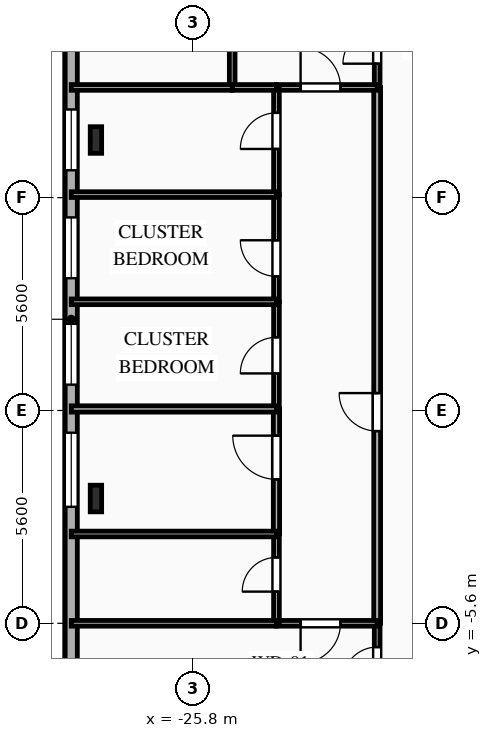
"""IFC4 building model, lengths in metres.
Left out: names, types, materials, properties, quantities, classifications, styles, units other than length and angle.
Written with IfcOpenShell. Run it as: python <this file> out.ifc"""

import sys

from ifc_helpers import new_model, si_unit, direction, frame, frame_2d, origin, origin_2d, place, context, subcontext, project, spatial, rectangle, i_section, extrude, element, fill, save


model = new_model("IFC4")
c1 = context("Model", 3, precision=1e-05, world=origin(), true_north=direction((0.0, 1.0)))
c2 = subcontext(c1, "Body", "Model", "MODEL_VIEW")
j1 = project(units=[si_unit("LENGTHUNIT", "METRE"), si_unit("PLANEANGLEUNIT", "RADIAN")], contexts=[c1])
p1 = place(None, origin())
s1 = spatial("IfcSite", under=j1, at=p1, CompositionType="ELEMENT")
p2 = place(p1, origin())
s2 = spatial("IfcBuilding", under=s1, at=p2, CompositionType="ELEMENT")
p3 = place(p2, frame((0.0, 0.0, 141.05)))
s3 = spatial("IfcBuildingStorey", under=s2, at=p3, CompositionType="ELEMENT", Elevation=141.05)
for number, where, z_axis, x_axis in (
    (1, (-28.35, 7.117, 0.0), (0.0, 0.0, 1.0), (1.0, 0.0, 0.0)),
    (2, (-28.35, -2.317, 0.0), (0.0, 0.0, 1.0), (1.0, 0.0, 0.0)),
):
    element("IfcColumn", number, at=place(p3, frame(where, z_axis=z_axis, x_axis=x_axis)), inside=s3, PredefinedType="COLUMN", context=c2, shape_type="SweptSolid", body=[
        extrude(i_section(OverallWidth=0.3, OverallDepth=0.7, WebThickness=0.017, FlangeThickness=0.032, FilletRadius=0.027, at=origin_2d()), origin(), (0.0, 0.0, 1.0), 3.35),
    ])
p4 = place(p3, frame((-29.0, -12.4, 0.0), z_axis=(0.0, 0.0, 1.0), x_axis=(0.0, 1.0, 0.0)))
e3 = element("IfcWall", 3, at=p4, inside=s3, PredefinedType="SOLIDWALL", context=c2, shape_type="SweptSolid", body=[
    extrude(rectangle(XDim=29.6, YDim=0.32, at=frame_2d((14.8, 0.0))), origin(), (0.0, 0.0, 1.0), 3.04),
])
p5 = place(p4, frame((2.855, 0.0, 0.85)))
e4 = element("IfcOpeningElement", 4, at=p5, cuts=e3, PredefinedType="OPENING", context=c2, shape_type="SweptSolid", body=[
    extrude(rectangle(XDim=1.65, YDim=1.85, at=frame_2d((0.825, 0.925))), frame((0.0, 0.17, 0.0), z_axis=(0.0, -1.0, 0.0), x_axis=(1.0, 0.0, 0.0)), (0.0, 0.0, 1.0), 0.34),
])
p6 = place(p4, frame((9.865, 0.0, 0.85)))
e5 = element("IfcOpeningElement", 5, at=p6, cuts=e3, PredefinedType="OPENING", context=c2, shape_type="SweptSolid", body=[
    extrude(rectangle(XDim=1.95, YDim=1.85, at=frame_2d((0.975, 0.925))), frame((0.0, 0.17, 0.0), z_axis=(0.0, -1.0, 0.0), x_axis=(1.0, 0.0, 0.0)), (0.0, 0.0, 1.0), 0.34),
])
p7 = place(p4, frame((13.08, 0.0, 0.85)))
e6 = element("IfcOpeningElement", 6, at=p7, cuts=e3, PredefinedType="OPENING", context=c2, shape_type="SweptSolid", body=[
    extrude(rectangle(XDim=1.6, YDim=1.85, at=frame_2d((0.8, 0.925))), frame((0.0, 0.17, 0.0), z_axis=(0.0, -1.0, 0.0), x_axis=(1.0, 0.0, 0.0)), (0.0, 0.0, 1.0), 0.34),
])
p8 = place(p4, frame((15.88, 0.0, 0.85)))
e7 = element("IfcOpeningElement", 7, at=p8, cuts=e3, PredefinedType="OPENING", context=c2, shape_type="SweptSolid", body=[
    extrude(rectangle(XDim=1.6, YDim=1.85, at=frame_2d((0.8, 0.925))), frame((0.0, 0.17, 0.0), z_axis=(0.0, -1.0, 0.0), x_axis=(1.0, 0.0, 0.0)), (0.0, 0.0, 1.0), 0.34),
])
p9 = place(p4, frame((18.72, 0.0, 0.85)))
e8 = element("IfcOpeningElement", 8, at=p9, cuts=e3, PredefinedType="OPENING", context=c2, shape_type="SweptSolid", body=[
    extrude(rectangle(XDim=1.6, YDim=1.85, at=frame_2d((0.8, 0.925))), frame((0.0, 0.17, 0.0), z_axis=(0.0, -1.0, 0.0), x_axis=(1.0, 0.0, 0.0)), (0.0, 0.0, 1.0), 0.34),
])
p10 = place(p4, frame((24.255, 0.0, 0.85)))
e9 = element("IfcOpeningElement", 9, at=p10, cuts=e3, PredefinedType="OPENING", context=c2, shape_type="SweptSolid", body=[
    extrude(rectangle(XDim=1.65, YDim=1.85, at=frame_2d((0.825, 0.925))), frame((0.0, 0.17, 0.0), z_axis=(0.0, -1.0, 0.0), x_axis=(1.0, 0.0, 0.0)), (0.0, 0.0, 1.0), 0.34),
])
p11 = place(p3, frame((-20.95, 8.5, 0.0), z_axis=(0.0, 0.0, 1.0), x_axis=(0.0, 1.0, 0.0)))
e10 = element("IfcWall", 10, at=p11, inside=s3, PredefinedType="PARTITIONING", context=c2, shape_type="SweptSolid", body=[
    extrude(rectangle(XDim=2.15, YDim=0.15, at=frame_2d((1.075, 0.0))), origin(), (0.0, 0.0, 1.0), 3.04),
])
p12 = place(p11, frame((0.625, 0.0, 0.0)))
e11 = element("IfcOpeningElement", 11, at=p12, cuts=e10, PredefinedType="OPENING", context=c2, shape_type="SweptSolid", body=[
    extrude(rectangle(XDim=0.9, YDim=2.1, at=frame_2d((0.45, 1.05))), frame((0.0, 0.085, 0.0), z_axis=(0.0, -1.0, 0.0), x_axis=(1.0, 0.0, 0.0)), (0.0, 0.0, 1.0), 0.17),
])
p13 = place(p3, frame((-20.95, -7.75, 0.0), z_axis=(0.0, 0.0, 1.0), x_axis=(0.0, 1.0, 0.0)))
e12 = element("IfcWall", 12, at=p13, inside=s3, PredefinedType="PARTITIONING", context=c2, shape_type="SweptSolid", body=[
    extrude(rectangle(XDim=2.15, YDim=0.15, at=frame_2d((1.075, 0.0))), origin(), (0.0, 0.0, 1.0), 3.04),
])
p14 = place(p13, frame((0.625, 0.0, 0.0)))
e13 = element("IfcOpeningElement", 13, at=p14, cuts=e12, PredefinedType="OPENING", context=c2, shape_type="SweptSolid", body=[
    extrude(rectangle(XDim=0.9, YDim=2.1, at=frame_2d((0.45, 1.05))), frame((0.0, 0.085, 0.0), z_axis=(0.0, -1.0, 0.0), x_axis=(1.0, 0.0, 0.0)), (0.0, 0.0, 1.0), 0.17),
])
p15 = place(p3, frame((-20.95, -5.6, 0.0), z_axis=(0.0, 0.0, 1.0), x_axis=(0.0, 1.0, 0.0)))
e14 = element("IfcWall", 14, at=p15, inside=s3, PredefinedType="PARTITIONING", context=c2, shape_type="SweptSolid", body=[
    extrude(rectangle(XDim=14.1, YDim=0.18, at=frame_2d((7.05, 0.0))), origin(), (0.0, 0.0, 1.0), 3.04),
])
p16 = place(p15, frame((5.058, 0.0, 0.0)))
e15 = element("IfcOpeningElement", 15, at=p16, cuts=e14, PredefinedType="OPENING", context=c2, shape_type="SweptSolid", body=[
    extrude(rectangle(XDim=1.0, YDim=2.15, at=frame_2d((0.5, 1.075))), frame((0.0, 0.1, 0.0), z_axis=(0.0, -1.0, 0.0), x_axis=(1.0, 0.0, 0.0)), (0.0, 0.0, 1.0), 0.2),
])
p17 = place(p3, frame((-23.6, 8.5, 0.0), z_axis=(0.0, 0.0, 1.0), x_axis=(1.0, 0.0, 0.0)))
e16 = element("IfcWall", 16, at=p17, inside=s3, PredefinedType="PARTITIONING", context=c2, shape_type="SweptSolid", body=[
    extrude(rectangle(XDim=2.65, YDim=0.15, at=frame_2d((1.325, 0.0))), origin(), (0.0, 0.0, 1.0), 3.04),
])
p18 = place(p17, frame((0.635, 0.0, 0.0)))
e17 = element("IfcOpeningElement", 17, at=p18, cuts=e16, PredefinedType="OPENING", context=c2, shape_type="SweptSolid", body=[
    extrude(rectangle(XDim=1.05, YDim=2.15, at=frame_2d((0.525, 1.075))), frame((0.0, 0.085, 0.0), z_axis=(0.0, -1.0, 0.0), x_axis=(1.0, 0.0, 0.0)), (0.0, 0.0, 1.0), 0.17),
])
p19 = place(p3, frame((-20.95, -5.6, 0.0), z_axis=(0.0, 0.0, 1.0), x_axis=(-1.0, 0.0, 0.0)))
e18 = element("IfcWall", 18, at=p19, inside=s3, PredefinedType="PARTITIONING", context=c2, shape_type="SweptSolid", body=[
    extrude(rectangle(XDim=2.65, YDim=0.15, at=frame_2d((1.325, 0.0))), origin(), (0.0, 0.0, 1.0), 3.04),
])
p20 = place(p19, frame((0.965, 0.0, 0.0)))
e19 = element("IfcOpeningElement", 19, at=p20, cuts=e18, PredefinedType="OPENING", context=c2, shape_type="SweptSolid", body=[
    extrude(rectangle(XDim=1.05, YDim=2.15, at=frame_2d((0.525, 1.075))), frame((0.0, 0.085, 0.0), z_axis=(0.0, -1.0, 0.0), x_axis=(1.0, 0.0, 0.0)), (0.0, 0.0, 1.0), 0.17),
])
p21 = place(p3, frame((-23.6, -5.6, 0.0), z_axis=(0.0, 0.0, 1.0), x_axis=(0.0, 1.0, 0.0)))
e20 = element("IfcWall", 20, at=p21, inside=s3, PredefinedType="PLUMBINGWALL", context=c2, shape_type="SweptSolid", body=[
    extrude(rectangle(XDim=2.35, YDim=0.15, at=frame_2d((1.175, 0.0))), origin(), (0.0, 0.0, 1.0), 2.695),
])
p22 = place(p21, frame((0.834, 0.0, 0.0)))
e21 = element("IfcOpeningElement", 21, at=p22, cuts=e20, PredefinedType="OPENING", context=c2, shape_type="SweptSolid", body=[
    extrude(rectangle(XDim=0.9, YDim=2.1, at=frame_2d((0.45, 1.05))), frame((0.0, 0.085, 0.0), z_axis=(0.0, -1.0, 0.0), x_axis=(1.0, 0.0, 0.0)), (0.0, 0.0, 1.0), 0.17),
])
p23 = place(p3, frame((-23.6, -3.25, 0.0), z_axis=(0.0, 0.0, 1.0), x_axis=(0.0, 1.0, 0.0)))
e22 = element("IfcWall", 22, at=p23, inside=s3, PredefinedType="PARTITIONING", context=c2, shape_type="SweptSolid", body=[
    extrude(rectangle(XDim=3.29, YDim=0.165, at=frame_2d((1.645, 0.0))), origin(), (0.0, 0.0, 1.0), 2.695),
])
p24 = place(p23, frame((1.438, 0.0, 0.0)))
e23 = element("IfcOpeningElement", 23, at=p24, cuts=e22, PredefinedType="OPENING", context=c2, shape_type="SweptSolid", body=[
    extrude(rectangle(XDim=1.15, YDim=2.15, at=frame_2d((0.575, 1.075))), frame((0.0, 0.093, 0.0), z_axis=(0.0, -1.0, 0.0), x_axis=(1.0, 0.0, 0.0)), (0.0, 0.0, 1.0), 0.185),
])
p25 = place(p3, frame((-23.6, 0.04, 0.0), z_axis=(0.0, 0.0, 1.0), x_axis=(0.0, 1.0, 0.0)))
e24 = element("IfcWall", 24, at=p25, inside=s3, PredefinedType="PARTITIONING", context=c2, shape_type="SweptSolid", body=[
    extrude(rectangle(XDim=2.82, YDim=0.15, at=frame_2d((1.41, 0.0))), origin(), (0.0, 0.0, 1.0), 2.695),
])
p26 = place(p25, frame((0.935, 0.0, 0.0)))
e25 = element("IfcOpeningElement", 25, at=p26, cuts=e24, PredefinedType="OPENING", context=c2, shape_type="SweptSolid", body=[
    extrude(rectangle(XDim=0.95, YDim=2.1, at=frame_2d((0.475, 1.05))), frame((0.0, 0.085, 0.0), z_axis=(0.0, -1.0, 0.0), x_axis=(1.0, 0.0, 0.0)), (0.0, 0.0, 1.0), 0.17),
])
p27 = place(p3, frame((-23.6, 2.86, 0.0), z_axis=(0.0, 0.0, 1.0), x_axis=(0.0, 1.0, 0.0)))
e26 = element("IfcWall", 26, at=p27, inside=s3, PredefinedType="PARTITIONING", context=c2, shape_type="SweptSolid", body=[
    extrude(rectangle(XDim=2.82, YDim=0.15, at=frame_2d((1.41, 0.0))), origin(), (0.0, 0.0, 1.0), 2.695),
])
p28 = place(p27, frame((0.669, 0.0, 0.0)))
e27 = element("IfcOpeningElement", 27, at=p28, cuts=e26, PredefinedType="OPENING", context=c2, shape_type="SweptSolid", body=[
    extrude(rectangle(XDim=0.95, YDim=2.1, at=frame_2d((0.475, 1.05))), frame((0.0, 0.085, 0.0), z_axis=(0.0, -1.0, 0.0), x_axis=(1.0, 0.0, 0.0)), (0.0, 0.0, 1.0), 0.17),
])
p29 = place(p3, frame((-23.6, 5.68, 0.0), z_axis=(0.0, 0.0, 1.0), x_axis=(0.0, 1.0, 0.0)))
e28 = element("IfcWall", 28, at=p29, inside=s3, PredefinedType="PARTITIONING", context=c2, shape_type="SweptSolid", body=[
    extrude(rectangle(XDim=2.82, YDim=0.15, at=frame_2d((1.41, 0.0))), origin(), (0.0, 0.0, 1.0), 2.695),
])
p30 = place(p29, frame((1.201, 0.0, 0.0)))
e29 = element("IfcOpeningElement", 29, at=p30, cuts=e28, PredefinedType="OPENING", context=c2, shape_type="SweptSolid", body=[
    extrude(rectangle(XDim=0.95, YDim=2.1, at=frame_2d((0.475, 1.05))), frame((0.0, 0.085, 0.0), z_axis=(0.0, -1.0, 0.0), x_axis=(1.0, 0.0, 0.0)), (0.0, 0.0, 1.0), 0.17),
])
p31 = place(p3, frame((-24.765, 8.5, 0.0), z_axis=(0.0, 0.0, 1.0), x_axis=(0.0, 1.0, 0.0)))
e30 = element("IfcWall", 30, at=p31, inside=s3, PredefinedType="PARTITIONING", context=c2, shape_type="SweptSolid", body=[
    extrude(rectangle(XDim=11.9, YDim=0.15, at=frame_2d((5.95, 0.0))), origin(), (0.0, 0.0, 1.0), 3.04),
])
p32 = place(p31, frame((3.002, 0.0, 0.0)))
e31 = element("IfcOpeningElement", 31, at=p32, cuts=e30, PredefinedType="OPENING", context=c2, shape_type="SweptSolid", body=[
    extrude(rectangle(XDim=1.05, YDim=2.15, at=frame_2d((0.525, 1.075))), frame((0.0, 0.085, 0.0), z_axis=(0.0, -1.0, 0.0), x_axis=(1.0, 0.0, 0.0)), (0.0, 0.0, 1.0), 0.17),
])
p33 = place(p3, frame((-23.6, 8.5, 0.0), z_axis=(0.0, 0.0, 1.0), x_axis=(-1.0, 0.0, 0.0)))
e32 = element("IfcWall", 32, at=p33, inside=s3, PredefinedType="PARTITIONING", context=c2, shape_type="SweptSolid", body=[
    extrude(rectangle(XDim=1.165, YDim=0.15, at=frame_2d((0.583, 0.0))), origin(), (0.0, 0.0, 1.0), 3.04),
])
p34 = place(p3, frame((-24.765, 8.5, 0.0), z_axis=(0.0, 0.0, 1.0), x_axis=(-1.0, 0.0, 0.0)))
e33 = element("IfcWall", 33, at=p34, inside=s3, PredefinedType="PARTITIONING", context=c2, shape_type="SweptSolid", body=[
    extrude(rectangle(XDim=4.235, YDim=0.15, at=frame_2d((2.118, 0.0))), origin(), (0.0, 0.0, 1.0), 3.04),
])
for number, where, z_axis, x_axis in (
    (34, (-29.0, -5.6, 0.0), (0.0, 0.0, 1.0), (1.0, 0.0, 0.0)),
    (35, (-29.0, -3.25, 0.0), (0.0, 0.0, 1.0), (1.0, 0.0, 0.0)),
):
    element("IfcWall", number, at=place(p3, frame(where, z_axis=z_axis, x_axis=x_axis)), inside=s3, PredefinedType="PLUMBINGWALL", context=c2, shape_type="SweptSolid", body=[
        extrude(rectangle(XDim=5.4, YDim=0.15, at=frame_2d((2.7, 0.0))), origin(), (0.0, 0.0, 1.0), 3.04),
    ])
p35 = place(p3, frame((-29.0, 0.04, 0.0), z_axis=(0.0, 0.0, 1.0), x_axis=(1.0, 0.0, 0.0)))
e36 = element("IfcWall", 36, at=p35, inside=s3, PredefinedType="PARTITIONING", context=c2, shape_type="SweptSolid", body=[
    extrude(rectangle(XDim=5.4, YDim=0.165, at=frame_2d((2.7, 0.0))), origin(), (0.0, 0.0, 1.0), 3.04),
])
for number, where, z_axis, x_axis in (
    (37, (-29.0, 2.86, 0.0), (0.0, 0.0, 1.0), (1.0, 0.0, 0.0)),
    (38, (-29.0, 5.68, 0.0), (0.0, 0.0, 1.0), (1.0, 0.0, 0.0)),
):
    element("IfcWall", number, at=place(p3, frame(where, z_axis=z_axis, x_axis=x_axis)), inside=s3, PredefinedType="PARTITIONING", context=c2, shape_type="SweptSolid", body=[
        extrude(rectangle(XDim=5.4, YDim=0.15, at=frame_2d((2.7, 0.0))), origin(), (0.0, 0.0, 1.0), 3.04),
    ])
p36 = place(p6, origin())
e39 = element("IfcWindow", 39, at=p36, inside=s3, PartitioningType="SINGLE_PANEL", PredefinedType="WINDOW", context=c2, shape_type="SweptSolid", body=[
    extrude(rectangle(XDim=1.95, YDim=1.85, at=frame_2d((0.975, 0.925))), frame((0.0, 0.03, 0.0), z_axis=(0.0, -1.0, 0.0), x_axis=(1.0, 0.0, 0.0)), (0.0, 0.0, 1.0), 0.06),
])
fill(e5, e39)
p37 = place(p7, origin())
e40 = element("IfcWindow", 40, at=p37, inside=s3, PartitioningType="SINGLE_PANEL", PredefinedType="WINDOW", context=c2, shape_type="SweptSolid", body=[
    extrude(rectangle(XDim=1.6, YDim=1.85, at=frame_2d((0.8, 0.925))), frame((0.0, 0.03, 0.0), z_axis=(0.0, -1.0, 0.0), x_axis=(1.0, 0.0, 0.0)), (0.0, 0.0, 1.0), 0.06),
])
fill(e6, e40)
p38 = place(p8, origin())
e41 = element("IfcWindow", 41, at=p38, inside=s3, PartitioningType="SINGLE_PANEL", PredefinedType="WINDOW", context=c2, shape_type="SweptSolid", body=[
    extrude(rectangle(XDim=1.6, YDim=1.85, at=frame_2d((0.8, 0.925))), frame((0.0, 0.03, 0.0), z_axis=(0.0, -1.0, 0.0), x_axis=(1.0, 0.0, 0.0)), (0.0, 0.0, 1.0), 0.06),
])
fill(e7, e41)
p39 = place(p9, origin())
e42 = element("IfcWindow", 42, at=p39, inside=s3, PartitioningType="SINGLE_PANEL", PredefinedType="WINDOW", context=c2, shape_type="SweptSolid", body=[
    extrude(rectangle(XDim=1.6, YDim=1.85, at=frame_2d((0.8, 0.925))), frame((0.0, 0.03, 0.0), z_axis=(0.0, -1.0, 0.0), x_axis=(1.0, 0.0, 0.0)), (0.0, 0.0, 1.0), 0.06),
])
fill(e8, e42)
p40 = place(p12, origin())
e43 = element("IfcDoor", 43, at=p40, inside=s3, OperationType="SINGLE_SWING_LEFT", PredefinedType="DOOR", context=c2, shape_type="SweptSolid", body=[
    extrude(rectangle(XDim=0.9, YDim=2.1, at=frame_2d((0.45, 1.05))), frame((0.0, 0.025, 0.0), z_axis=(0.0, -1.0, 0.0), x_axis=(1.0, 0.0, 0.0)), (0.0, 0.0, 1.0), 0.05),
])
fill(e11, e43)
p41 = place(p14, origin())
e44 = element("IfcDoor", 44, at=p41, inside=s3, OperationType="SINGLE_SWING_LEFT", PredefinedType="DOOR", context=c2, shape_type="SweptSolid", body=[
    extrude(rectangle(XDim=0.9, YDim=2.1, at=frame_2d((0.45, 1.05))), frame((0.0, 0.025, 0.0), z_axis=(0.0, -1.0, 0.0), x_axis=(1.0, 0.0, 0.0)), (0.0, 0.0, 1.0), 0.05),
])
fill(e13, e44)
p42 = place(p16, origin())
e45 = element("IfcDoor", 45, at=p42, inside=s3, OperationType="SINGLE_SWING_RIGHT", PredefinedType="DOOR", context=c2, shape_type="SweptSolid", body=[
    extrude(rectangle(XDim=1.0, YDim=2.15, at=frame_2d((0.5, 1.075))), frame((0.0, 0.025, 0.0), z_axis=(0.0, -1.0, 0.0), x_axis=(1.0, 0.0, 0.0)), (0.0, 0.0, 1.0), 0.05),
])
fill(e15, e45)
p43 = place(p18, origin())
e46 = element("IfcDoor", 46, at=p43, inside=s3, OperationType="SINGLE_SWING_LEFT", PredefinedType="DOOR", context=c2, shape_type="SweptSolid", body=[
    extrude(rectangle(XDim=1.05, YDim=2.15, at=frame_2d((0.525, 1.075))), frame((0.0, 0.025, 0.0), z_axis=(0.0, -1.0, 0.0), x_axis=(1.0, 0.0, 0.0)), (0.0, 0.0, 1.0), 0.05),
])
fill(e17, e46)
p44 = place(p20, origin())
e47 = element("IfcDoor", 47, at=p44, inside=s3, OperationType="SINGLE_SWING_RIGHT", PredefinedType="DOOR", context=c2, shape_type="SweptSolid", body=[
    extrude(rectangle(XDim=1.05, YDim=2.15, at=frame_2d((0.525, 1.075))), frame((0.0, 0.025, 0.0), z_axis=(0.0, -1.0, 0.0), x_axis=(1.0, 0.0, 0.0)), (0.0, 0.0, 1.0), 0.05),
])
fill(e19, e47)
p45 = place(p22, origin())
e48 = element("IfcDoor", 48, at=p45, inside=s3, OperationType="SINGLE_SWING_LEFT", PredefinedType="DOOR", context=c2, shape_type="SweptSolid", body=[
    extrude(rectangle(XDim=0.9, YDim=2.1, at=frame_2d((0.45, 1.05))), frame((0.0, 0.025, 0.0), z_axis=(0.0, -1.0, 0.0), x_axis=(1.0, 0.0, 0.0)), (0.0, 0.0, 1.0), 0.05),
])
fill(e21, e48)
p46 = place(p24, origin())
e49 = element("IfcDoor", 49, at=p46, inside=s3, OperationType="SINGLE_SWING_RIGHT", PredefinedType="DOOR", context=c2, shape_type="SweptSolid", body=[
    extrude(rectangle(XDim=1.15, YDim=2.15, at=frame_2d((0.575, 1.075))), frame((0.0, 0.025, 0.0), z_axis=(0.0, -1.0, 0.0), x_axis=(1.0, 0.0, 0.0)), (0.0, 0.0, 1.0), 0.05),
])
fill(e23, e49)
p47 = place(p26, origin())
e50 = element("IfcDoor", 50, at=p47, inside=s3, OperationType="SINGLE_SWING_LEFT", PredefinedType="DOOR", context=c2, shape_type="SweptSolid", body=[
    extrude(rectangle(XDim=0.95, YDim=2.1, at=frame_2d((0.475, 1.05))), frame((0.0, 0.025, 0.0), z_axis=(0.0, -1.0, 0.0), x_axis=(1.0, 0.0, 0.0)), (0.0, 0.0, 1.0), 0.05),
])
fill(e25, e50)
p48 = place(p28, origin())
e51 = element("IfcDoor", 51, at=p48, inside=s3, OperationType="SINGLE_SWING_RIGHT", PredefinedType="DOOR", context=c2, shape_type="SweptSolid", body=[
    extrude(rectangle(XDim=0.95, YDim=2.1, at=frame_2d((0.475, 1.05))), frame((0.0, 0.025, 0.0), z_axis=(0.0, -1.0, 0.0), x_axis=(1.0, 0.0, 0.0)), (0.0, 0.0, 1.0), 0.05),
])
fill(e27, e51)
p49 = place(p30, origin())
e52 = element("IfcDoor", 52, at=p49, inside=s3, OperationType="SINGLE_SWING_LEFT", PredefinedType="DOOR", context=c2, shape_type="SweptSolid", body=[
    extrude(rectangle(XDim=0.95, YDim=2.1, at=frame_2d((0.475, 1.05))), frame((0.0, 0.025, 0.0), z_axis=(0.0, -1.0, 0.0), x_axis=(1.0, 0.0, 0.0)), (0.0, 0.0, 1.0), 0.05),
])
fill(e29, e52)
save(model, sys.argv[1])
